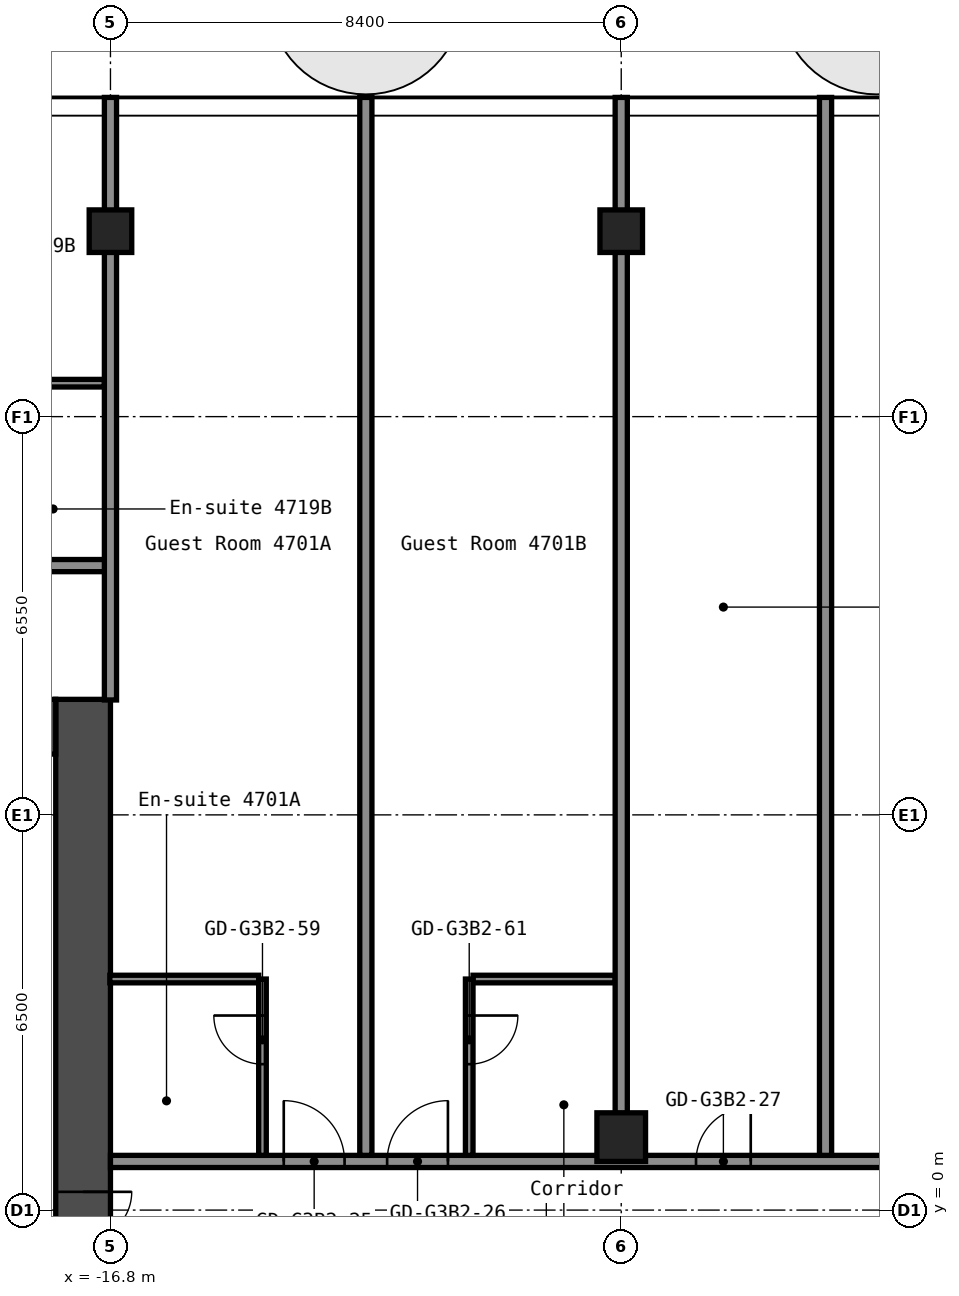
"""IFC4 building model, lengths in metres.
Left out: names, types, materials, properties, quantities, classifications, styles, units other than length and angle.
Written with IfcOpenShell. Run it as: python <this file> out.ifc"""

import sys

from ifc_helpers import new_model, si_unit, direction, frame, frame_2d, origin, origin_2d, place, context, subcontext, project, spatial, rectangle, hollow_rectangle, extrude, element, fill, save


model = new_model("IFC4")
c1 = context("Model", 3, precision=1e-05, world=origin(), true_north=direction((0.0, 1.0)))
c2 = subcontext(c1, "Body", "Model", "MODEL_VIEW")
j1 = project(units=[si_unit("LENGTHUNIT", "METRE"), si_unit("PLANEANGLEUNIT", "RADIAN")], contexts=[c1])
p1 = place(None, origin())
s1 = spatial("IfcSite", under=j1, at=p1, CompositionType="ELEMENT")
p2 = place(p1, origin())
s2 = spatial("IfcBuilding", under=s1, at=p2, CompositionType="ELEMENT")
p3 = place(p2, frame((0.0, 0.0, 166.2)))
s3 = spatial("IfcBuildingStorey", under=s2, at=p3, CompositionType="ELEMENT", Elevation=166.2)
p4 = place(p3, frame((-16.8, 16.1, 0.0), z_axis=(0.0, 0.0, 1.0), x_axis=(1.0, 0.0, 0.0)))
e1 = element("IfcColumn", 1, at=p4, inside=s3, PredefinedType="COLUMN", context=c2, shape_type="SweptSolid", body=[
    extrude(hollow_rectangle(XDim=0.7, YDim=0.7, WallThickness=0.028, at=origin_2d()), origin(), (0.0, 0.0, 1.0), 2.75),
])
p5 = place(p3, frame((-8.4, 1.2, 0.0), z_axis=(0.0, 0.0, 1.0), x_axis=(1.0, 0.0, 0.0)))
e2 = element("IfcColumn", 2, at=p5, inside=s3, PredefinedType="COLUMN", context=c2, shape_type="SweptSolid", body=[
    extrude(hollow_rectangle(XDim=0.8, YDim=0.8, WallThickness=0.032, at=origin_2d()), origin(), (0.0, 0.0, 1.0), 2.75),
])
p6 = place(p3, frame((-8.4, 16.1, 0.0), z_axis=(0.0, 0.0, 1.0), x_axis=(1.0, 0.0, 0.0)))
e3 = element("IfcColumn", 3, at=p6, inside=s3, PredefinedType="COLUMN", context=c2, shape_type="SweptSolid", body=[
    extrude(hollow_rectangle(XDim=0.7, YDim=0.7, WallThickness=0.028, at=origin_2d()), origin(), (0.0, 0.0, 1.0), 2.75),
])
p7 = place(p3, frame((-17.25, -8.4, 0.0), z_axis=(0.0, 0.0, 1.0), x_axis=(0.0, 1.0, 0.0)))
e4 = element("IfcWall", 4, at=p7, inside=s3, PredefinedType="SHEAR", context=c2, shape_type="SweptSolid", body=[
    extrude(rectangle(XDim=16.8, YDim=0.9, at=frame_2d((8.4, 0.0))), origin(), (0.0, 0.0, 1.0), 2.75),
])
p8 = place(p7, frame((7.1, 0.0, 0.0)))
e5 = element("IfcOpeningElement", 5, at=p8, cuts=e4, PredefinedType="OPENING", context=c2, shape_type="SweptSolid", body=[
    extrude(rectangle(XDim=1.6, YDim=2.1, at=frame_2d((0.8, 1.05))), frame((0.0, 0.46, 0.0), z_axis=(0.0, -1.0, 0.0), x_axis=(1.0, 0.0, 0.0)), (0.0, 0.0, 1.0), 0.92),
])
p9 = place(p3, frame((-32.7, 7.95, 0.0), z_axis=(0.0, 0.0, 1.0), x_axis=(1.0, 0.0, 0.0)))
e6 = element("IfcWall", 6, at=p9, inside=s3, PredefinedType="SHEAR", context=c2, shape_type="SweptSolid", body=[
    extrude(rectangle(XDim=15.0, YDim=0.9, at=frame_2d((7.5, 0.0))), origin(), (0.0, 0.0, 1.0), 2.75),
])
p10 = place(p9, frame((3.4, 0.0, 0.0)))
e7 = element("IfcOpeningElement", 7, at=p10, cuts=e6, PredefinedType="OPENING", context=c2, shape_type="SweptSolid", body=[
    extrude(rectangle(XDim=1.2, YDim=2.1, at=frame_2d((0.6, 1.05))), frame((0.0, 0.46, 0.0), z_axis=(0.0, -1.0, 0.0), x_axis=(1.0, 0.0, 0.0)), (0.0, 0.0, 1.0), 0.92),
])
p11 = place(p9, frame((0.75, 0.0, 0.0)))
e8 = element("IfcOpeningElement", 8, at=p11, cuts=e6, PredefinedType="OPENING", context=c2, shape_type="SweptSolid", body=[
    extrude(rectangle(XDim=0.9, YDim=2.1, at=frame_2d((0.45, 1.05))), frame((0.0, 0.46, 0.0), z_axis=(0.0, -1.0, 0.0), x_axis=(1.0, 0.0, 0.0)), (0.0, 0.0, 1.0), 0.92),
])
p12 = place(p3, frame((-16.8, 0.8, 0.0), z_axis=(0.0, 0.0, 1.0), x_axis=(1.0, 0.0, 0.0)))
e9 = element("IfcWall", 9, at=p12, inside=s3, PredefinedType="PARTITIONING", context=c2, shape_type="SweptSolid", body=[
    extrude(rectangle(XDim=33.6, YDim=0.2, at=frame_2d((16.8, 0.0))), origin(), (0.0, 0.0, 1.0), 2.75),
])
p13 = place(p12, frame((2.85, 0.0, 0.0)))
e10 = element("IfcOpeningElement", 10, at=p13, cuts=e9, PredefinedType="OPENING", context=c2, shape_type="SweptSolid", body=[
    extrude(rectangle(XDim=1.0, YDim=2.1, at=frame_2d((0.5, 1.05))), frame((0.0, 0.11, 0.0), z_axis=(0.0, -1.0, 0.0), x_axis=(1.0, 0.0, 0.0)), (0.0, 0.0, 1.0), 0.22),
])
p14 = place(p12, frame((4.55, 0.0, 0.0)))
e11 = element("IfcOpeningElement", 11, at=p14, cuts=e9, PredefinedType="OPENING", context=c2, shape_type="SweptSolid", body=[
    extrude(rectangle(XDim=1.0, YDim=2.1, at=frame_2d((0.5, 1.05))), frame((0.0, 0.11, 0.0), z_axis=(0.0, -1.0, 0.0), x_axis=(1.0, 0.0, 0.0)), (0.0, 0.0, 1.0), 0.22),
])
p15 = place(p12, frame((9.63, 0.0, 0.0)))
e12 = element("IfcOpeningElement", 12, at=p15, cuts=e9, PredefinedType="OPENING", context=c2, shape_type="SweptSolid", body=[
    extrude(rectangle(XDim=0.9, YDim=2.1, at=frame_2d((0.45, 1.05))), frame((0.0, 0.11, 0.0), z_axis=(0.0, -1.0, 0.0), x_axis=(1.0, 0.0, 0.0)), (0.0, 0.0, 1.0), 0.22),
])
p16 = place(p12, frame((13.83, 0.0, 0.0)))
e13 = element("IfcOpeningElement", 13, at=p16, cuts=e9, PredefinedType="OPENING", context=c2, shape_type="SweptSolid", body=[
    extrude(rectangle(XDim=0.9, YDim=2.1, at=frame_2d((0.45, 1.05))), frame((0.0, 0.11, 0.0), z_axis=(0.0, -1.0, 0.0), x_axis=(1.0, 0.0, 0.0)), (0.0, 0.0, 1.0), 0.22),
])
p17 = place(p12, frame((19.65, 0.0, 0.0)))
e14 = element("IfcOpeningElement", 14, at=p17, cuts=e9, PredefinedType="OPENING", context=c2, shape_type="SweptSolid", body=[
    extrude(rectangle(XDim=1.0, YDim=2.1, at=frame_2d((0.5, 1.05))), frame((0.0, 0.11, 0.0), z_axis=(0.0, -1.0, 0.0), x_axis=(1.0, 0.0, 0.0)), (0.0, 0.0, 1.0), 0.22),
])
p18 = place(p12, frame((21.35, 0.0, 0.0)))
e15 = element("IfcOpeningElement", 15, at=p18, cuts=e9, PredefinedType="OPENING", context=c2, shape_type="SweptSolid", body=[
    extrude(rectangle(XDim=1.0, YDim=2.1, at=frame_2d((0.5, 1.05))), frame((0.0, 0.11, 0.0), z_axis=(0.0, -1.0, 0.0), x_axis=(1.0, 0.0, 0.0)), (0.0, 0.0, 1.0), 0.22),
])
p19 = place(p12, frame((28.05, 0.0, 0.0)))
e16 = element("IfcOpeningElement", 16, at=p19, cuts=e9, PredefinedType="OPENING", context=c2, shape_type="SweptSolid", body=[
    extrude(rectangle(XDim=1.0, YDim=2.1, at=frame_2d((0.5, 1.05))), frame((0.0, 0.11, 0.0), z_axis=(0.0, -1.0, 0.0), x_axis=(1.0, 0.0, 0.0)), (0.0, 0.0, 1.0), 0.22),
])
p20 = place(p12, frame((29.75, 0.0, 0.0)))
e17 = element("IfcOpeningElement", 17, at=p20, cuts=e9, PredefinedType="OPENING", context=c2, shape_type="SweptSolid", body=[
    extrude(rectangle(XDim=1.0, YDim=2.1, at=frame_2d((0.5, 1.05))), frame((0.0, 0.11, 0.0), z_axis=(0.0, -1.0, 0.0), x_axis=(1.0, 0.0, 0.0)), (0.0, 0.0, 1.0), 0.22),
])
p21 = place(p3, frame((-16.81, 3.8, 0.0), z_axis=(0.0, 0.0, 1.0), x_axis=(1.0, 0.0, 0.0)))
e18 = element("IfcWall", 18, at=p21, inside=s3, PredefinedType="PARTITIONING", context=c2, shape_type="SweptSolid", body=[
    extrude(rectangle(XDim=2.448, YDim=0.125, at=frame_2d((1.224, 0.0))), origin(), (0.0, 0.0, 1.0), 2.75),
])
p22 = place(p3, frame((-10.837, 3.8, 0.0), z_axis=(0.0, 0.0, 1.0), x_axis=(1.0, 0.0, 0.0)))
e19 = element("IfcWall", 19, at=p22, inside=s3, PredefinedType="PARTITIONING", context=c2, shape_type="SweptSolid", body=[
    extrude(rectangle(XDim=2.337, YDim=0.125, at=frame_2d((1.169, 0.0))), origin(), (0.0, 0.0, 1.0), 2.75),
])
p23 = place(p3, frame((-42.7, 10.6, 0.0), z_axis=(0.0, 0.0, 1.0), x_axis=(1.0, 0.0, 0.0)))
e20 = element("IfcWall", 20, at=p23, inside=s3, PredefinedType="PARTITIONING", context=c2, shape_type="SweptSolid", body=[
    extrude(rectangle(XDim=25.9, YDim=0.2, at=frame_2d((12.95, 0.0))), origin(), (0.0, 0.0, 1.0), 2.75),
])
p24 = place(p23, frame((3.25, 0.0, 0.0)))
e21 = element("IfcOpeningElement", 21, at=p24, cuts=e20, PredefinedType="OPENING", context=c2, shape_type="SweptSolid", body=[
    extrude(rectangle(XDim=1.0, YDim=2.1, at=frame_2d((0.5, 1.05))), frame((0.0, 0.11, 0.0), z_axis=(0.0, -1.0, 0.0), x_axis=(1.0, 0.0, 0.0)), (0.0, 0.0, 1.0), 0.22),
])
p25 = place(p23, frame((5.15, 0.0, 0.0)))
e22 = element("IfcOpeningElement", 22, at=p25, cuts=e20, PredefinedType="OPENING", context=c2, shape_type="SweptSolid", body=[
    extrude(rectangle(XDim=1.0, YDim=2.1, at=frame_2d((0.5, 1.05))), frame((0.0, 0.11, 0.0), z_axis=(0.0, -1.0, 0.0), x_axis=(1.0, 0.0, 0.0)), (0.0, 0.0, 1.0), 0.22),
])
p26 = place(p23, frame((11.95, 0.0, 0.0)))
e23 = element("IfcOpeningElement", 23, at=p26, cuts=e20, PredefinedType="OPENING", context=c2, shape_type="SweptSolid", body=[
    extrude(rectangle(XDim=1.0, YDim=2.1, at=frame_2d((0.5, 1.05))), frame((0.0, 0.11, 0.0), z_axis=(0.0, -1.0, 0.0), x_axis=(1.0, 0.0, 0.0)), (0.0, 0.0, 1.0), 0.22),
])
p27 = place(p23, frame((13.65, 0.0, 0.0)))
e24 = element("IfcOpeningElement", 24, at=p27, cuts=e20, PredefinedType="OPENING", context=c2, shape_type="SweptSolid", body=[
    extrude(rectangle(XDim=1.0, YDim=2.1, at=frame_2d((0.5, 1.05))), frame((0.0, 0.11, 0.0), z_axis=(0.0, -1.0, 0.0), x_axis=(1.0, 0.0, 0.0)), (0.0, 0.0, 1.0), 0.22),
])
p28 = place(p23, frame((20.35, 0.0, 0.0)))
e25 = element("IfcOpeningElement", 25, at=p28, cuts=e20, PredefinedType="OPENING", context=c2, shape_type="SweptSolid", body=[
    extrude(rectangle(XDim=1.0, YDim=2.1, at=frame_2d((0.5, 1.05))), frame((0.0, 0.11, 0.0), z_axis=(0.0, -1.0, 0.0), x_axis=(1.0, 0.0, 0.0)), (0.0, 0.0, 1.0), 0.22),
])
p29 = place(p23, frame((22.05, 0.0, 0.0)))
e26 = element("IfcOpeningElement", 26, at=p29, cuts=e20, PredefinedType="OPENING", context=c2, shape_type="SweptSolid", body=[
    extrude(rectangle(XDim=1.0, YDim=2.1, at=frame_2d((0.5, 1.05))), frame((0.0, 0.11, 0.0), z_axis=(0.0, -1.0, 0.0), x_axis=(1.0, 0.0, 0.0)), (0.0, 0.0, 1.0), 0.22),
])
p30 = place(p3, frame((-19.238, 13.6, 0.0), z_axis=(0.0, 0.0, 1.0), x_axis=(1.0, 0.0, 0.0)))
e27 = element("IfcWall", 27, at=p30, inside=s3, PredefinedType="PARTITIONING", context=c2, shape_type="SweptSolid", body=[
    extrude(rectangle(XDim=2.338, YDim=0.125, at=frame_2d((1.169, 0.0))), origin(), (0.0, 0.0, 1.0), 2.75),
])
p31 = place(p3, frame((-16.8, 8.39, 0.0), z_axis=(0.0, 0.0, 1.0), x_axis=(0.0, 1.0, 0.0)))
e28 = element("IfcWall", 28, at=p31, inside=s3, PredefinedType="PARTITIONING", context=c2, shape_type="SweptSolid", body=[
    extrude(rectangle(XDim=9.91, YDim=0.2, at=frame_2d((4.955, 0.0))), origin(), (0.0, 0.0, 1.0), 2.75),
])
p32 = place(p3, frame((-14.3, 0.9, 0.0), z_axis=(0.0, 0.0, 1.0), x_axis=(0.0, 1.0, 0.0)))
e29 = element("IfcWall", 29, at=p32, inside=s3, PredefinedType="PARTITIONING", context=c2, shape_type="SweptSolid", body=[
    extrude(rectangle(XDim=2.9, YDim=0.125, at=frame_2d((1.45, 0.0))), origin(), (0.0, 0.0, 1.0), 2.75),
])
p33 = place(p32, frame((1.5, 0.0, 0.0)))
e30 = element("IfcOpeningElement", 30, at=p33, cuts=e29, PredefinedType="OPENING", context=c2, shape_type="SweptSolid", body=[
    extrude(rectangle(XDim=0.8, YDim=2.1, at=frame_2d((0.4, 1.05))), frame((0.0, 0.073, 0.0), z_axis=(0.0, -1.0, 0.0), x_axis=(1.0, 0.0, 0.0)), (0.0, 0.0, 1.0), 0.145),
])
p34 = place(p3, frame((-12.6, 0.9, 0.0), z_axis=(0.0, 0.0, 1.0), x_axis=(0.0, 1.0, 0.0)))
e31 = element("IfcWall", 31, at=p34, inside=s3, PredefinedType="PARTITIONING", context=c2, shape_type="SweptSolid", body=[
    extrude(rectangle(XDim=17.4, YDim=0.2, at=frame_2d((8.7, 0.0))), origin(), (0.0, 0.0, 1.0), 2.75),
])
p35 = place(p3, frame((-10.9, 0.9, 0.0), z_axis=(0.0, 0.0, 1.0), x_axis=(0.0, 1.0, 0.0)))
e32 = element("IfcWall", 32, at=p35, inside=s3, PredefinedType="PARTITIONING", context=c2, shape_type="SweptSolid", body=[
    extrude(rectangle(XDim=2.9, YDim=0.125, at=frame_2d((1.45, 0.0))), origin(), (0.0, 0.0, 1.0), 2.75),
])
p36 = place(p35, frame((1.5, 0.0, 0.0)))
e33 = element("IfcOpeningElement", 33, at=p36, cuts=e32, PredefinedType="OPENING", context=c2, shape_type="SweptSolid", body=[
    extrude(rectangle(XDim=0.8, YDim=2.1, at=frame_2d((0.4, 1.05))), frame((0.0, 0.073, 0.0), z_axis=(0.0, -1.0, 0.0), x_axis=(1.0, 0.0, 0.0)), (0.0, 0.0, 1.0), 0.145),
])
p37 = place(p3, frame((-8.4, 1.59, 0.0), z_axis=(0.0, 0.0, 1.0), x_axis=(0.0, 1.0, 0.0)))
e34 = element("IfcWall", 34, at=p37, inside=s3, PredefinedType="PARTITIONING", context=c2, shape_type="SweptSolid", body=[
    extrude(rectangle(XDim=16.71, YDim=0.2, at=frame_2d((8.355, 0.0))), origin(), (0.0, 0.0, 1.0), 2.75),
])
p38 = place(p3, frame((-5.04, 0.9, 0.0), z_axis=(0.0, 0.0, 1.0), x_axis=(0.0, 1.0, 0.0)))
e35 = element("IfcWall", 35, at=p38, inside=s3, PredefinedType="PARTITIONING", context=c2, shape_type="SweptSolid", body=[
    extrude(rectangle(XDim=17.4, YDim=0.2, at=frame_2d((8.7, 0.0))), origin(), (0.0, 0.0, 1.0), 2.75),
])
p39 = place(p8, origin())
e36 = element("IfcDoor", 36, at=p39, inside=s3, OperationType="DOUBLE_DOOR_SINGLE_SWING", PredefinedType="DOOR", context=c2, shape_type="SweptSolid", body=[
    extrude(rectangle(XDim=1.6, YDim=2.1, at=frame_2d((0.8, 1.05))), frame((0.0, 0.025, 0.0), z_axis=(0.0, -1.0, 0.0), x_axis=(1.0, 0.0, 0.0)), (0.0, 0.0, 1.0), 0.05),
])
fill(e5, e36)
p40 = place(p13, origin())
e37 = element("IfcDoor", 37, at=p40, inside=s3, OperationType="SINGLE_SWING_RIGHT", PredefinedType="DOOR", context=c2, shape_type="SweptSolid", body=[
    extrude(rectangle(XDim=1.0, YDim=2.1, at=frame_2d((0.5, 1.05))), frame((0.0, 0.025, 0.0), z_axis=(0.0, -1.0, 0.0), x_axis=(1.0, 0.0, 0.0)), (0.0, 0.0, 1.0), 0.05),
])
fill(e10, e37)
p41 = place(p14, origin())
e38 = element("IfcDoor", 38, at=p41, inside=s3, OperationType="SINGLE_SWING_LEFT", PredefinedType="DOOR", context=c2, shape_type="SweptSolid", body=[
    extrude(rectangle(XDim=1.0, YDim=2.1, at=frame_2d((0.5, 1.05))), frame((0.0, 0.025, 0.0), z_axis=(0.0, -1.0, 0.0), x_axis=(1.0, 0.0, 0.0)), (0.0, 0.0, 1.0), 0.05),
])
fill(e11, e38)
p42 = place(p15, origin())
e39 = element("IfcDoor", 39, at=p42, inside=s3, OperationType="SINGLE_SWING_LEFT", PredefinedType="DOOR", context=c2, shape_type="SweptSolid", body=[
    extrude(rectangle(XDim=0.9, YDim=2.1, at=frame_2d((0.45, 1.05))), frame((0.0, 0.025, 0.0), z_axis=(0.0, -1.0, 0.0), x_axis=(1.0, 0.0, 0.0)), (0.0, 0.0, 1.0), 0.05),
])
fill(e12, e39)
p43 = place(p33, origin())
e40 = element("IfcDoor", 40, at=p43, inside=s3, OperationType="SINGLE_SWING_LEFT", PredefinedType="DOOR", context=c2, shape_type="SweptSolid", body=[
    extrude(rectangle(XDim=0.8, YDim=2.1, at=frame_2d((0.4, 1.05))), frame((0.0, 0.025, 0.0), z_axis=(0.0, -1.0, 0.0), x_axis=(1.0, 0.0, 0.0)), (0.0, 0.0, 1.0), 0.05),
])
fill(e30, e40)
p44 = place(p36, origin())
e41 = element("IfcDoor", 41, at=p44, inside=s3, OperationType="SINGLE_SWING_RIGHT", PredefinedType="DOOR", context=c2, shape_type="SweptSolid", body=[
    extrude(rectangle(XDim=0.8, YDim=2.1, at=frame_2d((0.4, 1.05))), frame((0.0, 0.025, 0.0), z_axis=(0.0, -1.0, 0.0), x_axis=(1.0, 0.0, 0.0)), (0.0, 0.0, 1.0), 0.05),
])
fill(e33, e41)
save(model, sys.argv[1])
